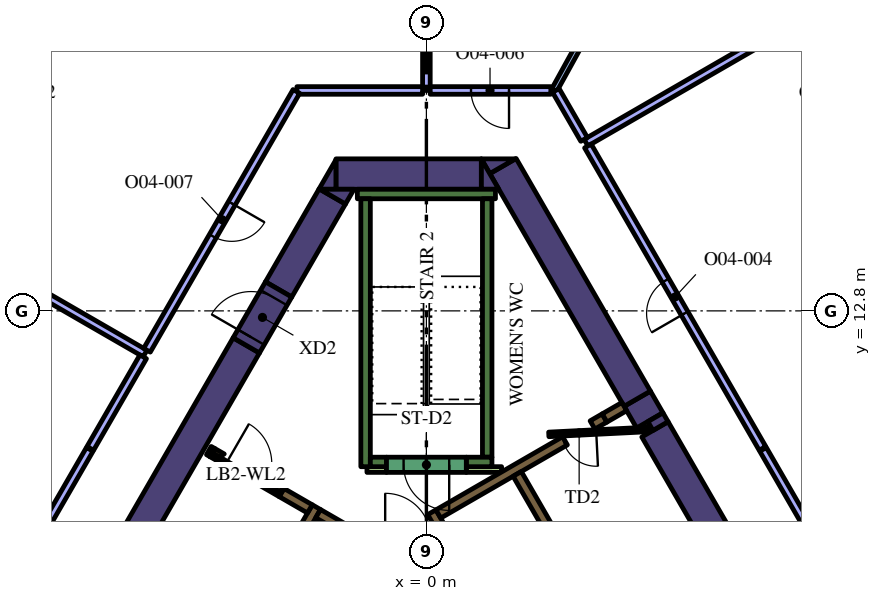
"""IFC4 building model, lengths in metres.
Left out: names, types, materials, properties, quantities, classifications, styles, units other than length and angle.
Written with IfcOpenShell. Run it as: python <this file> out.ifc"""

import sys

from ifc_helpers import new_model, si_unit, direction, frame, frame_2d, origin, place, context, subcontext, project, spatial, polyline, rectangle, outline, extrude, element, fill, save


model = new_model("IFC4")
c1 = context("Model", 3, precision=1e-05, world=origin(), true_north=direction((0.0, 1.0)))
c2 = subcontext(c1, "Body", "Model", "MODEL_VIEW")
j1 = project(units=[si_unit("LENGTHUNIT", "METRE"), si_unit("PLANEANGLEUNIT", "RADIAN")], contexts=[c1])
p1 = place(None, origin())
s1 = spatial("IfcSite", under=j1, at=p1, CompositionType="ELEMENT")
p2 = place(p1, origin())
s2 = spatial("IfcBuilding", under=s1, at=p2, CompositionType="ELEMENT")
p3 = place(p2, frame((0.0, 0.0, 187.8)))
s3 = spatial("IfcBuildingStorey", under=s2, at=p3, CompositionType="ELEMENT", Elevation=187.8)
p4 = place(p3, frame((5.878, 9.918, 0.0), z_axis=(0.0, 0.0, 1.0), x_axis=(-0.499893918903, 0.866086641072, 0.0)))
e1 = element("IfcWall", 1, at=p4, inside=s3, PredefinedType="SOLIDWALL", context=c2, shape_type="SweptSolid", body=[
    extrude(rectangle(XDim=0.657, YDim=0.8, at=frame_2d((0.329, 0.0))), origin(), (0.0, 0.0, 1.0), 4.2),
])
p5 = place(p3, frame((8.279, 5.761, 0.0), z_axis=(0.0, 0.0, 1.0), x_axis=(-0.500024261398, 0.866011396007, 0.0)))
e2 = element("IfcWall", 2, at=p5, inside=s3, PredefinedType="SOLIDWALL", context=c2, shape_type="SweptSolid", body=[
    extrude(rectangle(XDim=4.528, YDim=0.8, at=frame_2d((2.264, 0.0))), origin(), (0.0, 0.0, 1.0), 4.2),
])
p6 = place(p3, origin())
e3 = element("IfcWall", 3, at=p6, inside=s3, PredefinedType="SOLIDWALL", context=c2, shape_type="SweptSolid", body=[
    extrude(outline(polyline([(5.961, 9.654), (5.827, 9.886), (6.226, 10.116), (6.36, 9.884), (5.961, 9.654)])), origin(), (0.0, 0.0, 1.0), 4.2),
])
p7 = place(p3, frame((5.549, 10.489, 0.0), z_axis=(0.0, 0.0, 1.0), x_axis=(-0.50001746176, 0.866015321998, 0.0)))
e4 = element("IfcWall", 4, at=p7, inside=s3, PredefinedType="SOLIDWALL", context=c2, shape_type="SweptSolid", body=[
    extrude(rectangle(XDim=7.068, YDim=0.8, at=frame_2d((3.534, 0.0))), origin(), (0.0, 0.0, 1.0), 4.2),
])
e5 = element("IfcWall", 5, at=p6, inside=s3, PredefinedType="SOLIDWALL", context=c2, shape_type="SweptSolid", body=[
    extrude(outline(polyline([(1.443, 16.8), (2.339, 16.8), (1.667, 16.412), (1.443, 16.8)])), origin(), (0.0, 0.0, 1.0), 4.2),
])
p8 = place(p3, frame((-2.379, 16.4, 0.0), z_axis=(0.0, 0.0, 1.0), x_axis=(1.0, 0.0, 0.0)))
e6 = element("IfcWall", 6, at=p8, inside=s3, PredefinedType="SOLIDWALL", context=c2, shape_type="SweptSolid", body=[
    extrude(rectangle(XDim=3.824, YDim=0.8, at=frame_2d((1.912, 0.0))), origin(), (0.0, 0.0, 1.0), 4.2),
])
e7 = element("IfcWall", 7, at=p6, inside=s3, PredefinedType="SOLIDWALL", context=c2, shape_type="SweptSolid", body=[
    extrude(outline(polyline([(1.905, 16.0), (1.447, 16.0), (1.447, 16.793), (1.905, 16.0)])), origin(), (0.0, 0.0, 1.0), 4.2),
])
e8 = element("IfcWall", 8, at=p6, inside=s3, PredefinedType="SOLIDWALL", context=c2, shape_type="SweptSolid", body=[
    extrude(outline(polyline([(-2.829, 16.0), (-2.381, 16.776), (-2.381, 16.0), (-2.829, 16.0)])), origin(), (0.0, 0.0, 1.0), 4.2),
])
p9 = place(p3, frame((-2.477, 15.81, 0.0), z_axis=(0.0, 0.0, 1.0), x_axis=(-0.499969377405, -0.866043083026, 0.0)))
e9 = element("IfcWall", 9, at=p9, inside=s3, PredefinedType="SOLIDWALL", context=c2, shape_type="SweptSolid", body=[
    extrude(rectangle(XDim=2.824, YDim=0.8, at=frame_2d((1.412, 0.0))), origin(), (0.0, 0.0, 1.0), 4.2),
])
e10 = element("IfcWall", 10, at=p6, inside=s3, PredefinedType="SOLIDWALL", context=c2, shape_type="SweptSolid", body=[
    extrude(outline(polyline([(-1.905, 16.0), (-2.129, 15.612), (-2.801, 16.0), (-1.905, 16.0)])), origin(), (0.0, 0.0, 1.0), 4.2),
])
p10 = place(p3, frame((-12.668, -1.842, 0.0), z_axis=(0.0, 0.0, 1.0), x_axis=(0.500003640647, 0.866023301845, 0.0)))
e11 = element("IfcWall", 11, at=p10, inside=s3, PredefinedType="SOLIDWALL", context=c2, shape_type="SweptSolid", body=[
    extrude(rectangle(XDim=15.858, YDim=0.8, at=frame_2d((7.929, 0.0))), origin(), (0.0, 0.0, 1.0), 4.2),
])
p11 = place(p3, frame((-1.817, 15.875, 0.0), z_axis=(0.0, 0.0, 1.0), x_axis=(1.0, 0.0, 0.0)))
e12 = element("IfcWall", 12, at=p11, inside=s3, PredefinedType="SOLIDWALL", context=c2, shape_type="SweptSolid", body=[
    extrude(rectangle(XDim=3.634, YDim=0.25, at=frame_2d((1.817, 0.0))), origin(), (0.0, 0.0, 1.0), 4.2),
])
p12 = place(p3, frame((1.6, 8.95, 0.0), z_axis=(0.0, 0.0, 1.0), x_axis=(0.0, 1.0, 0.0)))
e13 = element("IfcWall", 13, at=p12, inside=s3, PredefinedType="SOLIDWALL", context=c2, shape_type="SweptSolid", body=[
    extrude(rectangle(XDim=6.8, YDim=0.25, at=frame_2d((3.4, 0.0))), origin(), (0.0, 0.0, 1.0), 4.2),
])
p13 = place(p3, frame((1.05, 8.825, 0.0), z_axis=(0.0, 0.0, 1.0), x_axis=(1.0, 0.0, 0.0)))
e14 = element("IfcWall", 14, at=p13, inside=s3, PredefinedType="SOLIDWALL", context=c2, shape_type="SweptSolid", body=[
    extrude(rectangle(XDim=0.675, YDim=0.25, at=frame_2d((0.337, 0.0))), origin(), (0.0, 0.0, 1.0), 4.2),
])
p14 = place(p3, frame((-1.6, 8.7, 0.0), z_axis=(0.0, 0.0, 1.0), x_axis=(0.0, 1.0, 0.0)))
e15 = element("IfcWall", 15, at=p14, inside=s3, PredefinedType="SOLIDWALL", context=c2, shape_type="SweptSolid", body=[
    extrude(rectangle(XDim=7.05, YDim=0.25, at=frame_2d((3.525, 0.0))), origin(), (0.0, 0.0, 1.0), 4.2),
])
p15 = place(p3, frame((-1.475, 8.825, 0.0), z_axis=(0.0, 0.0, 1.0), x_axis=(1.0, 0.0, 0.0)))
e16 = element("IfcWall", 16, at=p15, inside=s3, PredefinedType="SOLIDWALL", context=c2, shape_type="SweptSolid", body=[
    extrude(rectangle(XDim=0.425, YDim=0.25, at=frame_2d((0.212, 0.0))), origin(), (0.0, 0.0, 1.0), 4.2),
])
p16 = place(p3, frame((0.417, 7.027, 0.0), z_axis=(0.0, 0.0, 1.0), x_axis=(-0.500210807569, 0.865903659763, 0.0)))
e17 = element("IfcWall", 17, at=p16, inside=s3, PredefinedType="SOLIDWALL", context=c2, shape_type="SweptSolid", body=[
    extrude(rectangle(XDim=0.548, YDim=0.25, at=frame_2d((0.274, 0.0))), origin(), (0.0, 0.0, 1.0), 4.2),
])
p17 = place(p3, frame((3.647, 9.38, 0.0), z_axis=(0.0, 0.0, 1.0), x_axis=(-0.866025015791, -0.500000672024, 0.0)))
e18 = element("IfcWall", 18, at=p17, inside=s3, PredefinedType="SOLIDWALL", context=c2, shape_type="SweptSolid", body=[
    extrude(rectangle(XDim=3.849, YDim=0.25, at=frame_2d((1.924, 0.0))), origin(), (0.0, 0.0, 1.0), 4.2),
])
p18 = place(p3, frame((4.688, 9.981, 0.0), z_axis=(0.0, 0.0, 1.0), x_axis=(-0.865974312977, -0.500088481434, 0.0)))
e19 = element("IfcWall", 19, at=p18, inside=s3, PredefinedType="SOLIDWALL", context=c2, shape_type="SweptSolid", body=[
    extrude(rectangle(XDim=0.366, YDim=0.25, at=frame_2d((0.183, 0.0))), origin(), (0.0, 0.0, 1.0), 4.2),
])
p19 = place(p3, frame((4.689, 9.982, 0.0), z_axis=(0.0, 0.0, 1.0), x_axis=(0.865947592822, 0.500134748329, 0.0)))
e20 = element("IfcWall", 20, at=p19, inside=s3, PredefinedType="SOLIDWALL", context=c2, shape_type="SweptSolid", body=[
    extrude(rectangle(XDim=0.598, YDim=0.25, at=frame_2d((0.299, 0.0))), origin(), (0.0, 0.0, 1.0), 4.2),
])
p20 = place(p3, frame((-8.06, -1.311, 0.0), z_axis=(0.0, 0.0, 1.0), x_axis=(0.50000273126, 0.866023826885, 0.0)))
e21 = element("IfcWall", 21, at=p20, inside=s3, PredefinedType="SOLIDWALL", context=c2, shape_type="SweptSolid", body=[
    extrude(rectangle(XDim=10.33, YDim=0.25, at=frame_2d((5.165, 0.0))), origin(), (0.0, 0.0, 1.0), 4.2),
])
p21 = place(p3, frame((-1.76, 6.836, 0.0), z_axis=(0.0, 0.0, 1.0), x_axis=(-0.865952863304, 0.500125622755, 0.0)))
e22 = element("IfcWall", 22, at=p21, inside=s3, PredefinedType="SOLIDWALL", context=c2, shape_type="SweptSolid", body=[
    extrude(rectangle(XDim=1.258, YDim=0.25, at=frame_2d((0.629, 0.0))), origin(), (0.0, 0.0, 1.0), 4.2),
])
p22 = place(p3, frame((-5.725, 9.125, 0.0), z_axis=(0.0, 0.0, 1.0), x_axis=(0.866185586049, -0.49972245349, 0.0)))
e23 = element("IfcWall", 23, at=p22, inside=s3, PredefinedType="SOLIDWALL", context=c2, shape_type="SweptSolid", body=[
    extrude(rectangle(XDim=0.11, YDim=0.25, at=frame_2d((0.055, 0.0))), origin(), (0.0, 0.0, 1.0), 4.2),
])
p23 = place(p3, frame((-3.066, 7.59, 0.0), z_axis=(0.0, 0.0, 1.0), x_axis=(-0.866081358704, 0.49990307071, 0.0)))
e24 = element("IfcWall", 24, at=p23, inside=s3, PredefinedType="SOLIDWALL", context=c2, shape_type="SweptSolid", body=[
    extrude(rectangle(XDim=0.858, YDim=0.25, at=frame_2d((0.429, 0.0))), origin(), (0.0, 0.0, 1.0), 4.2),
])
e25 = element("IfcWall", 25, at=p6, inside=s3, PredefinedType="SOLIDWALL", context=c2, shape_type="SweptSolid", body=[
    extrude(outline(polyline([(-3.748, 8.128), (-3.813, 8.015), (-4.027, 8.139), (-4.017, 8.156), (-4.008, 8.173), (-4.0, 8.192), (-3.995, 8.21), (-3.991, 8.23), (-3.99, 8.25), (-3.99, 8.268), (-3.748, 8.128)])), origin(), (0.0, 0.0, 1.0), 4.2),
])
e26 = element("IfcWall", 26, at=p6, inside=s3, PredefinedType="SOLIDWALL", context=c2, shape_type="SweptSolid", body=[
    extrude(outline(polyline([(-5.689, 8.96), (-5.69, 8.961), (-5.565, 9.177), (-5.319, 9.035), (-5.335, 9.026), (-5.351, 9.015), (-5.366, 9.002), (-5.379, 8.988), (-5.392, 8.972), (-5.402, 8.956), (-5.412, 8.939), (-5.629, 9.064), (-5.629, 9.064), (-5.689, 8.96)])), origin(), (0.0, 0.0, 1.0), 4.2),
])
p24 = place(p3, frame((1.05, 8.625, 0.0), z_axis=(0.0, 0.0, 1.0), x_axis=(1.0, 0.0, 0.0)))
e27 = element("IfcWall", 27, at=p24, inside=s3, PredefinedType="PARTITIONING", context=c2, shape_type="SweptSolid", body=[
    extrude(rectangle(XDim=0.929, YDim=0.15, at=frame_2d((0.464, 0.0))), origin(), (0.0, 0.0, 1.0), 3.15),
])
p25 = place(p3, frame((-1.564, 8.625, 0.0), z_axis=(0.0, 0.0, 1.0), x_axis=(1.0, 0.0, 0.0)))
e28 = element("IfcWall", 28, at=p25, inside=s3, PredefinedType="PARTITIONING", context=c2, shape_type="SweptSolid", body=[
    extrude(rectangle(XDim=0.514, YDim=0.15, at=frame_2d((0.257, 0.0))), origin(), (0.0, 0.0, 1.0), 3.15),
])
p26 = place(p3, frame((8.565, -2.185, 0.0), z_axis=(0.0, 0.0, 1.0), x_axis=(-0.499997954832, 0.866026584559, 0.0)))
e29 = element("IfcWall", 29, at=p26, inside=s3, PredefinedType="SOLIDWALL", context=c2, shape_type="SweptSolid", body=[
    extrude(rectangle(XDim=12.35, YDim=0.25, at=frame_2d((6.175, 0.0))), origin(), (0.0, 0.0, 1.0), 4.2),
])
p27 = place(p26, frame((0.585, 0.0, 0.0)))
e30 = element("IfcOpeningElement", 30, at=p27, cuts=e29, PredefinedType="OPENING", context=c2, shape_type="SweptSolid", body=[
    extrude(rectangle(XDim=1.1, YDim=2.1, at=frame_2d((0.55, 1.05))), frame((0.0, 0.135, 0.0), z_axis=(0.0, -1.0, 0.0), x_axis=(1.0, 0.0, 0.0)), (0.0, 0.0, 1.0), 0.27),
])
p28 = place(p3, frame((1.05, 8.75, 0.0), z_axis=(0.0, 0.0, 1.0), x_axis=(-1.0, 0.0, 0.0)))
e31 = element("IfcWall", 31, at=p28, inside=s3, PredefinedType="SOLIDWALL", context=c2, shape_type="SweptSolid", body=[
    extrude(rectangle(XDim=2.1, YDim=0.4, at=frame_2d((1.05, 0.0))), origin(), (0.0, 0.0, 1.0), 4.2),
])
p29 = place(p28, frame((0.45, 0.0, 0.0)))
e32 = element("IfcOpeningElement", 32, at=p29, cuts=e31, PredefinedType="OPENING", context=c2, shape_type="SweptSolid", body=[
    extrude(rectangle(XDim=1.2, YDim=2.1, at=frame_2d((0.6, 1.05))), frame((0.0, 0.21, 0.0), z_axis=(0.0, -1.0, 0.0), x_axis=(1.0, 0.0, 0.0)), (0.0, 0.0, 1.0), 0.42),
])
p30 = place(p3, frame((5.917, 9.684, 0.0), z_axis=(0.0, 0.0, 1.0), x_axis=(-0.998758194515, -0.049820366212, 0.0)))
e33 = element("IfcWall", 33, at=p30, inside=s3, PredefinedType="PARTITIONING", context=c2, shape_type="SweptSolid", body=[
    extrude(rectangle(XDim=2.7, YDim=0.12, at=frame_2d((1.35, 0.0))), origin(), (0.0, 0.0, 1.0), 3.15),
])
p31 = place(p30, frame((1.45, 0.0, 0.0)))
e34 = element("IfcOpeningElement", 34, at=p31, cuts=e33, PredefinedType="OPENING", context=c2, shape_type="SweptSolid", body=[
    extrude(rectangle(XDim=0.9, YDim=2.1, at=frame_2d((0.45, 1.05))), frame((0.0, 0.07, 0.0), z_axis=(0.0, -1.0, 0.0), x_axis=(1.0, 0.0, 0.0)), (0.0, 0.0, 1.0), 0.14),
])
p32 = place(p3, frame((-5.659, 9.012, 0.0), z_axis=(0.0, 0.0, 1.0), x_axis=(0.866009402589, -0.500027713859, 0.0)))
e35 = element("IfcWall", 35, at=p32, inside=s3, PredefinedType="PARTITIONING", context=c2, shape_type="SweptSolid", body=[
    extrude(rectangle(XDim=2.1, YDim=0.12, at=frame_2d((1.05, 0.0))), origin(), (0.0, 0.0, 1.0), 3.15),
])
p33 = place(p32, frame((0.45, 0.0, 0.0)))
e36 = element("IfcOpeningElement", 36, at=p33, cuts=e35, PredefinedType="OPENING", context=c2, shape_type="SweptSolid", body=[
    extrude(rectangle(XDim=1.2, YDim=2.1, at=frame_2d((0.6, 1.05))), frame((0.0, 0.07, 0.0), z_axis=(0.0, -1.0, 0.0), x_axis=(1.0, 0.0, 0.0)), (0.0, 0.0, 1.0), 0.14),
])
p34 = place(p3, frame((-4.739, 11.892, 0.0), z_axis=(0.0, 0.0, 1.0), x_axis=(0.500062241894, 0.865989465428, 0.0)))
e37 = element("IfcWall", 37, at=p34, inside=s3, PredefinedType="SOLIDWALL", context=c2, shape_type="SweptSolid", body=[
    extrude(rectangle(XDim=1.7, YDim=0.8, at=frame_2d((0.85, 0.0))), origin(), (0.0, 0.0, 1.0), 4.2),
])
p35 = place(p34, frame((0.25, 0.0, 0.0)))
e38 = element("IfcOpeningElement", 38, at=p35, cuts=e37, PredefinedType="OPENING", context=c2, shape_type="SweptSolid", body=[
    extrude(rectangle(XDim=1.2, YDim=2.1, at=frame_2d((0.6, 1.05))), frame((0.0, 0.41, 0.0), z_axis=(0.0, -1.0, 0.0), x_axis=(1.0, 0.0, 0.0)), (0.0, 0.0, 1.0), 0.82),
])
p36 = place(p3, frame((4.2, 17.226, 0.0), z_axis=(0.0, 0.0, 1.0), x_axis=(0.866021486214, 0.500006785369, 0.0)))
e39 = element("IfcWall", 39, at=p36, inside=s3, PredefinedType="PARTITIONING", context=c2, shape_type="SweptSolid", body=[
    extrude(rectangle(XDim=8.126, YDim=0.2, at=frame_2d((4.063, 0.0))), origin(), (0.0, 0.0, 1.0), 3.15),
])
p37 = place(p3, frame((12.359, 3.094, 0.0), z_axis=(0.0, 0.0, 1.0), x_axis=(-0.500010275428, 0.866019471182, 0.0)))
e40 = element("IfcWall", 40, at=p37, inside=s3, PredefinedType="PARTITIONING", context=c2, shape_type="SweptSolid", body=[
    extrude(rectangle(XDim=7.0, YDim=0.2, at=frame_2d((3.5, 0.0))), origin(), (0.0, 0.0, 1.0), 3.15),
])
p38 = place(p3, frame((8.844, 9.182, 0.0), z_axis=(0.0, 0.0, 1.0), x_axis=(-0.50000000053, 0.866025403479, 0.0)))
e41 = element("IfcWall", 41, at=p38, inside=s3, PredefinedType="PARTITIONING", context=c2, shape_type="SweptSolid", body=[
    extrude(rectangle(XDim=9.188, YDim=0.2, at=frame_2d((4.594, 0.0))), origin(), (0.0, 0.0, 1.0), 3.15),
])
p39 = place(p38, frame((4.1, 0.0, 0.0)))
e42 = element("IfcOpeningElement", 42, at=p39, cuts=e41, PredefinedType="OPENING", context=c2, shape_type="SweptSolid", body=[
    extrude(rectangle(XDim=1.0, YDim=2.1, at=frame_2d((0.5, 1.05))), frame((0.0, 0.11, 0.0), z_axis=(0.0, -1.0, 0.0), x_axis=(1.0, 0.0, 0.0)), (0.0, 0.0, 1.0), 0.22),
])
p40 = place(p3, frame((7.698, 26.465, 0.0), z_axis=(0.0, 0.0, 1.0), x_axis=(-0.482998301798, -0.875621288263, 0.0)))
e43 = element("IfcWall", 43, at=p40, inside=s3, PredefinedType="PARTITIONING", context=c2, shape_type="SweptSolid", body=[
    extrude(rectangle(XDim=8.982, YDim=0.15, at=frame_2d((4.491, 0.0))), origin(), (0.0, 0.0, 1.0), 3.15),
])
p41 = place(p40, frame((4.083, 0.0, 0.0)))
e44 = element("IfcOpeningElement", 44, at=p41, cuts=e43, PredefinedType="OPENING", context=c2, shape_type="SweptSolid", body=[
    extrude(rectangle(XDim=0.9, YDim=2.1, at=frame_2d((0.45, 1.05))), frame((0.0, 0.085, 0.0), z_axis=(0.0, -1.0, 0.0), x_axis=(1.0, 0.0, 0.0)), (0.0, 0.0, 1.0), 0.17),
])
p42 = place(p3, frame((4.15, 17.312, 0.0), z_axis=(0.0, 0.0, 1.0), x_axis=(-0.499935638681, 0.86606255962, 0.0)))
e45 = element("IfcWall", 45, at=p42, inside=s3, PredefinedType="PARTITIONING", context=c2, shape_type="SweptSolid", body=[
    extrude(rectangle(XDim=1.487, YDim=0.2, at=frame_2d((0.744, 0.0))), origin(), (0.0, 0.0, 1.0), 3.15),
])
p43 = place(p3, frame((0.0, 18.6, 0.0), z_axis=(0.0, 0.0, 1.0), x_axis=(0.0, 1.0, 0.0)))
e46 = element("IfcWall", 46, at=p43, inside=s3, PredefinedType="PARTITIONING", context=c2, shape_type="SweptSolid", body=[
    extrude(rectangle(XDim=10.754, YDim=0.2, at=frame_2d((5.377, 0.0))), origin(), (0.0, 0.0, 1.0), 3.15),
])
p44 = place(p3, frame((3.274, 18.6, 0.0), z_axis=(0.0, 0.0, 1.0), x_axis=(-1.0, 0.0, 0.0)))
e47 = element("IfcWall", 47, at=p44, inside=s3, PredefinedType="PARTITIONING", context=c2, shape_type="SweptSolid", body=[
    extrude(rectangle(XDim=3.174, YDim=0.2, at=frame_2d((1.587, 0.0))), origin(), (0.0, 0.0, 1.0), 3.15),
])
p45 = place(p44, frame((1.1, 0.0, 0.0)))
e48 = element("IfcOpeningElement", 48, at=p45, cuts=e47, PredefinedType="OPENING", context=c2, shape_type="SweptSolid", body=[
    extrude(rectangle(XDim=1.0, YDim=2.1, at=frame_2d((0.5, 1.05))), frame((0.0, 0.11, 0.0), z_axis=(0.0, -1.0, 0.0), x_axis=(1.0, 0.0, 0.0)), (0.0, 0.0, 1.0), 0.22),
])
p46 = place(p3, frame((-7.403, 11.678, 0.0), z_axis=(0.0, 0.0, 1.0), x_axis=(-0.866029143232, 0.499993523031, 0.0)))
e49 = element("IfcWall", 49, at=p46, inside=s3, PredefinedType="PARTITIONING", context=c2, shape_type="SweptSolid", body=[
    extrude(rectangle(XDim=8.42, YDim=0.2, at=frame_2d((4.21, 0.0))), origin(), (0.0, 0.0, 1.0), 3.15),
])
p47 = place(p3, frame((-0.1, 18.6, 0.0), z_axis=(0.0, 0.0, 1.0), x_axis=(-1.0, 0.0, 0.0)))
e50 = element("IfcWall", 50, at=p47, inside=s3, PredefinedType="PARTITIONING", context=c2, shape_type="SweptSolid", body=[
    extrude(rectangle(XDim=3.306, YDim=0.2, at=frame_2d((1.653, 0.0))), origin(), (0.0, 0.0, 1.0), 3.15),
])
p48 = place(p3, frame((-3.421, 18.574, 0.0), z_axis=(0.0, 0.0, 1.0), x_axis=(-0.499989434416, -0.866031503741, 0.0)))
e51 = element("IfcWall", 51, at=p48, inside=s3, PredefinedType="PARTITIONING", context=c2, shape_type="SweptSolid", body=[
    extrude(rectangle(XDim=7.863, YDim=0.2, at=frame_2d((3.932, 0.0))), origin(), (0.0, 0.0, 1.0), 3.15),
])
p49 = place(p48, frame((3.4, 0.0, 0.0)))
e52 = element("IfcOpeningElement", 52, at=p49, cuts=e51, PredefinedType="OPENING", context=c2, shape_type="SweptSolid", body=[
    extrude(rectangle(XDim=1.0, YDim=2.1, at=frame_2d((0.5, 1.05))), frame((0.0, 0.11, 0.0), z_axis=(0.0, -1.0, 0.0), x_axis=(1.0, 0.0, 0.0)), (0.0, 0.0, 1.0), 0.22),
])
p50 = place(p3, frame((-8.859, 9.156, 0.0), z_axis=(0.0, 0.0, 1.0), x_axis=(-0.500010275428, -0.866019471182, 0.0)))
e53 = element("IfcWall", 53, at=p50, inside=s3, PredefinedType="PARTITIONING", context=c2, shape_type="SweptSolid", body=[
    extrude(rectangle(XDim=7.0, YDim=0.2, at=frame_2d((3.5, 0.0))), origin(), (0.0, 0.0, 1.0), 3.15),
])
p51 = place(p3, frame((-7.453, 11.591, 0.0), z_axis=(0.0, 0.0, 1.0), x_axis=(-0.499980749935, -0.866036517529, 0.0)))
e54 = element("IfcWall", 54, at=p51, inside=s3, PredefinedType="PARTITIONING", context=c2, shape_type="SweptSolid", body=[
    extrude(rectangle(XDim=2.782, YDim=0.2, at=frame_2d((1.391, 0.0))), origin(), (0.0, 0.0, 1.0), 3.15),
])
p52 = place(p3, frame((12.783, 19.171, 0.0), z_axis=(0.0, 0.0, 1.0), x_axis=(-0.551892811511, 0.833915058386, 0.0)))
e55 = element("IfcWall", 55, at=p52, inside=s3, PredefinedType="SOLIDWALL", context=c2, shape_type="SweptSolid", body=[
    extrude(rectangle(XDim=5.204, YDim=0.24, at=frame_2d((2.602, 0.0))), origin(), (0.0, 0.0, 1.0), 3.95),
])
p53 = place(p52, frame((0.248, 0.0, 0.9)))
e56 = element("IfcOpeningElement", 56, at=p53, cuts=e55, PredefinedType="OPENING", context=c2, shape_type="SweptSolid", body=[
    extrude(rectangle(XDim=1.5, YDim=2.55, at=frame_2d((0.75, 1.275))), frame((0.0, 0.13, 0.0), z_axis=(0.0, -1.0, 0.0), x_axis=(1.0, 0.0, 0.0)), (0.0, 0.0, 1.0), 0.26),
])
p54 = place(p52, frame((3.455, 0.0, 0.9)))
e57 = element("IfcOpeningElement", 57, at=p54, cuts=e55, PredefinedType="OPENING", context=c2, shape_type="SweptSolid", body=[
    extrude(rectangle(XDim=1.5, YDim=2.55, at=frame_2d((0.75, 1.275))), frame((0.0, 0.13, 0.0), z_axis=(0.0, -1.0, 0.0), x_axis=(1.0, 0.0, 0.0)), (0.0, 0.0, 1.0), 0.26),
])
p55 = place(p3, frame((-9.911, 23.51, 0.0), z_axis=(0.0, 0.0, 1.0), x_axis=(-0.551892811511, -0.833915058386, 0.0)))
e58 = element("IfcWall", 58, at=p55, inside=s3, PredefinedType="SOLIDWALL", context=c2, shape_type="SweptSolid", body=[
    extrude(rectangle(XDim=5.204, YDim=0.24, at=frame_2d((2.602, 0.0))), origin(), (0.0, 0.0, 1.0), 3.95),
])
p56 = place(p55, frame((0.248, 0.0, 0.9)))
e59 = element("IfcOpeningElement", 59, at=p56, cuts=e58, PredefinedType="OPENING", context=c2, shape_type="SweptSolid", body=[
    extrude(rectangle(XDim=1.5, YDim=2.55, at=frame_2d((0.75, 1.275))), frame((0.0, 0.13, 0.0), z_axis=(0.0, -1.0, 0.0), x_axis=(1.0, 0.0, 0.0)), (0.0, 0.0, 1.0), 0.26),
])
p57 = place(p55, frame((3.455, 0.0, 0.9)))
e60 = element("IfcOpeningElement", 60, at=p57, cuts=e58, PredefinedType="OPENING", context=c2, shape_type="SweptSolid", body=[
    extrude(rectangle(XDim=1.5, YDim=2.55, at=frame_2d((0.75, 1.275))), frame((0.0, 0.13, 0.0), z_axis=(0.0, -1.0, 0.0), x_axis=(1.0, 0.0, 0.0)), (0.0, 0.0, 1.0), 0.26),
])
p58 = place(p29, origin())
e61 = element("IfcDoor", 61, at=p58, inside=s3, OperationType="SINGLE_SWING_LEFT", PredefinedType="DOOR", context=c2, shape_type="SweptSolid", body=[
    extrude(rectangle(XDim=1.2, YDim=2.1, at=frame_2d((0.6, 1.05))), frame((0.0, 0.025, 0.0), z_axis=(0.0, -1.0, 0.0), x_axis=(1.0, 0.0, 0.0)), (0.0, 0.0, 1.0), 0.05),
])
fill(e32, e61)
p59 = place(p31, origin())
e62 = element("IfcDoor", 62, at=p59, inside=s3, OperationType="SINGLE_SWING_LEFT", PredefinedType="DOOR", context=c2, shape_type="SweptSolid", body=[
    extrude(rectangle(XDim=0.9, YDim=2.1, at=frame_2d((0.45, 1.05))), frame((0.0, 0.025, 0.0), z_axis=(0.0, -1.0, 0.0), x_axis=(1.0, 0.0, 0.0)), (0.0, 0.0, 1.0), 0.05),
])
fill(e34, e62)
p60 = place(p33, origin())
e63 = element("IfcDoor", 63, at=p60, inside=s3, OperationType="SINGLE_SWING_LEFT", PredefinedType="DOOR", context=c2, shape_type="SweptSolid", body=[
    extrude(rectangle(XDim=1.2, YDim=2.1, at=frame_2d((0.6, 1.05))), frame((0.0, 0.025, 0.0), z_axis=(0.0, -1.0, 0.0), x_axis=(1.0, 0.0, 0.0)), (0.0, 0.0, 1.0), 0.05),
])
fill(e36, e63)
p61 = place(p35, origin())
e64 = element("IfcDoor", 64, at=p61, inside=s3, OperationType="SINGLE_SWING_LEFT", PredefinedType="DOOR", context=c2, shape_type="SweptSolid", body=[
    extrude(rectangle(XDim=1.2, YDim=2.1, at=frame_2d((0.6, 1.05))), frame((0.0, 0.025, 0.0), z_axis=(0.0, -1.0, 0.0), x_axis=(1.0, 0.0, 0.0)), (0.0, 0.0, 1.0), 0.05),
])
fill(e38, e64)
p62 = place(p39, origin())
e65 = element("IfcDoor", 65, at=p62, inside=s3, OperationType="SINGLE_SWING_RIGHT", PredefinedType="DOOR", context=c2, shape_type="SweptSolid", body=[
    extrude(rectangle(XDim=1.0, YDim=2.1, at=frame_2d((0.5, 1.05))), frame((0.0, 0.025, 0.0), z_axis=(0.0, -1.0, 0.0), x_axis=(1.0, 0.0, 0.0)), (0.0, 0.0, 1.0), 0.05),
])
fill(e42, e65)
p63 = place(p45, origin())
e66 = element("IfcDoor", 66, at=p63, inside=s3, OperationType="SINGLE_SWING_RIGHT", PredefinedType="DOOR", context=c2, shape_type="SweptSolid", body=[
    extrude(rectangle(XDim=1.0, YDim=2.1, at=frame_2d((0.5, 1.05))), frame((0.0, 0.025, 0.0), z_axis=(0.0, -1.0, 0.0), x_axis=(1.0, 0.0, 0.0)), (0.0, 0.0, 1.0), 0.05),
])
fill(e48, e66)
p64 = place(p49, origin())
e67 = element("IfcDoor", 67, at=p64, inside=s3, OperationType="SINGLE_SWING_LEFT", PredefinedType="DOOR", context=c2, shape_type="SweptSolid", body=[
    extrude(rectangle(XDim=1.0, YDim=2.1, at=frame_2d((0.5, 1.05))), frame((0.0, 0.025, 0.0), z_axis=(0.0, -1.0, 0.0), x_axis=(1.0, 0.0, 0.0)), (0.0, 0.0, 1.0), 0.05),
])
fill(e52, e67)
save(model, sys.argv[1])
